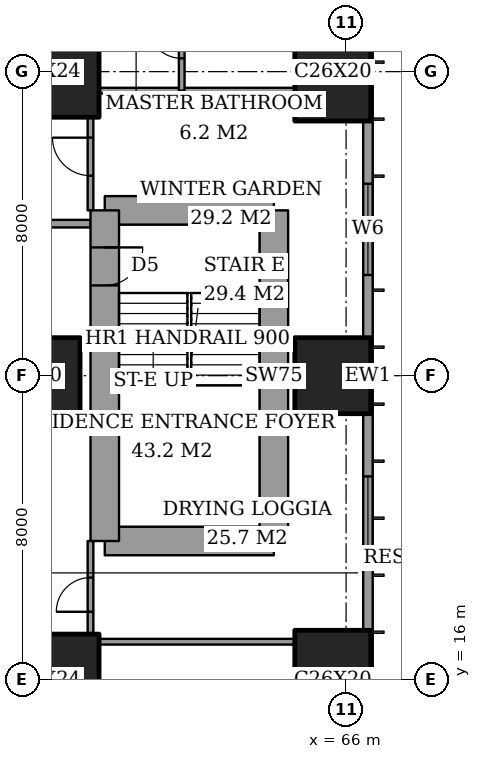
"""IFC4 building model, lengths in metres.
Left out: names, types, materials, properties, quantities, classifications, styles, units other than length and angle.
Written with IfcOpenShell. Run it as: python <this file> out.ifc"""

import sys

from ifc_helpers import new_model, si_unit, direction, frame, frame_2d, origin, origin_2d, place, context, subcontext, project, spatial, rectangle, extrude, element, fill, save


model = new_model("IFC4")
c1 = context("Model", 3, precision=1e-05, world=origin(), true_north=direction((0.0, 1.0)))
c2 = subcontext(c1, "Body", "Model", "MODEL_VIEW")
j1 = project(units=[si_unit("LENGTHUNIT", "METRE"), si_unit("PLANEANGLEUNIT", "RADIAN")], contexts=[c1])
p1 = place(None, origin())
s1 = spatial("IfcSite", under=j1, at=p1, CompositionType="ELEMENT")
p2 = place(p1, origin())
s2 = spatial("IfcBuilding", under=s1, at=p2, CompositionType="ELEMENT")
p3 = place(p2, frame((0.0, 0.0, 54.8)))
s3 = spatial("IfcBuildingStorey", under=s2, at=p3, CompositionType="ELEMENT", Elevation=54.8)
p4 = place(p3, frame((58.0, 16.0, 0.0), z_axis=(0.0, 0.0, 1.0), x_axis=(1.0, 0.0, 0.0)))
e1 = element("IfcColumn", 1, at=p4, inside=s3, PredefinedType="COLUMN", context=c2, shape_type="SweptSolid", body=[
    extrude(rectangle(XDim=3.0, YDim=2.4, at=origin_2d()), origin(), (0.0, 0.0, 1.0), 3.6),
])
p5 = place(p3, frame((58.0, 24.0, 0.0), z_axis=(0.0, 0.0, 1.0), x_axis=(1.0, 0.0, 0.0)))
e2 = element("IfcColumn", 2, at=p5, inside=s3, PredefinedType="COLUMN", context=c2, shape_type="SweptSolid", body=[
    extrude(rectangle(XDim=2.0, YDim=2.0, at=origin_2d()), origin(), (0.0, 0.0, 1.0), 3.6),
])
p6 = place(p3, frame((58.0, 32.0, 0.0), z_axis=(0.0, 0.0, 1.0), x_axis=(1.0, 0.0, 0.0)))
e3 = element("IfcColumn", 3, at=p6, inside=s3, PredefinedType="COLUMN", context=c2, shape_type="SweptSolid", body=[
    extrude(rectangle(XDim=3.0, YDim=2.4, at=origin_2d()), origin(), (0.0, 0.0, 1.0), 3.6),
])
p7 = place(p3, frame((65.65, 16.0, 0.0), z_axis=(0.0, 0.0, 1.0), x_axis=(0.0, 1.0, 0.0)))
e4 = element("IfcColumn", 4, at=p7, inside=s3, PredefinedType="COLUMN", context=c2, shape_type="SweptSolid", body=[
    extrude(rectangle(XDim=2.6, YDim=2.0, at=origin_2d()), origin(), (0.0, 0.0, 1.0), 3.6),
])
p8 = place(p3, frame((65.65, 24.0, 0.0), z_axis=(0.0, 0.0, 1.0), x_axis=(1.0, 0.0, 0.0)))
e5 = element("IfcColumn", 5, at=p8, inside=s3, PredefinedType="COLUMN", context=c2, shape_type="SweptSolid", body=[
    extrude(rectangle(XDim=2.0, YDim=2.0, at=origin_2d()), origin(), (0.0, 0.0, 1.0), 3.6),
])
p9 = place(p3, frame((65.65, 32.0, 0.0), z_axis=(0.0, 0.0, 1.0), x_axis=(0.0, 1.0, 0.0)))
e6 = element("IfcColumn", 6, at=p9, inside=s3, PredefinedType="COLUMN", context=c2, shape_type="SweptSolid", body=[
    extrude(rectangle(XDim=2.6, YDim=2.0, at=origin_2d()), origin(), (0.0, 0.0, 1.0), 3.6),
])
p10 = place(p3, frame((59.65, 19.65, 0.0), z_axis=(0.0, 0.0, 1.0), x_axis=(1.0, 0.0, 0.0)))
e7 = element("IfcWall", 7, at=p10, inside=s3, PredefinedType="SHEAR", context=c2, shape_type="SweptSolid", body=[
    extrude(rectangle(XDim=4.45, YDim=0.75, at=frame_2d((2.225, 0.0))), origin(), (0.0, 0.0, 1.0), 3.6),
])
p11 = place(p3, frame((64.1, 19.65, 0.0), z_axis=(0.0, 0.0, 1.0), x_axis=(0.0, 1.0, 0.0)))
e8 = element("IfcWall", 8, at=p11, inside=s3, PredefinedType="SHEAR", context=c2, shape_type="SweptSolid", body=[
    extrude(rectangle(XDim=8.7, YDim=0.75, at=frame_2d((4.35, 0.0))), origin(), (0.0, 0.0, 1.0), 3.6),
])
p12 = place(p3, frame((64.1, 28.35, 0.0), z_axis=(0.0, 0.0, 1.0), x_axis=(-1.0, 0.0, 0.0)))
e9 = element("IfcWall", 9, at=p12, inside=s3, PredefinedType="SHEAR", context=c2, shape_type="SweptSolid", body=[
    extrude(rectangle(XDim=4.45, YDim=0.75, at=frame_2d((2.225, 0.0))), origin(), (0.0, 0.0, 1.0), 3.6),
])
p13 = place(p3, frame((59.65, 28.35, 0.0), z_axis=(0.0, 0.0, 1.0), x_axis=(0.0, -1.0, 0.0)))
e10 = element("IfcWall", 10, at=p13, inside=s3, PredefinedType="SHEAR", context=c2, shape_type="SweptSolid", body=[
    extrude(rectangle(XDim=8.7, YDim=0.75, at=frame_2d((4.35, 0.0))), origin(), (0.0, 0.0, 1.0), 3.6),
])
p14 = place(p13, frame((0.975, 0.0, 0.0)))
e11 = element("IfcOpeningElement", 11, at=p14, cuts=e10, PredefinedType="OPENING", context=c2, shape_type="SweptSolid", body=[
    extrude(rectangle(XDim=1.0, YDim=2.1, at=frame_2d((0.5, 1.05))), frame((0.0, 0.385, 0.0), z_axis=(0.0, -1.0, 0.0), x_axis=(1.0, 0.0, 0.0)), (0.0, 0.0, 1.0), 0.77),
])
p15 = place(p3, frame((66.575, 3.175, 0.0), z_axis=(0.0, 0.0, 1.0), x_axis=(0.0, 1.0, 0.0)))
e12 = element("IfcWall", 12, at=p15, inside=s3, PredefinedType="SOLIDWALL", context=c2, shape_type="SweptSolid", body=[
    extrude(rectangle(XDim=41.65, YDim=0.25, at=frame_2d((20.825, 0.0))), origin(), (0.0, 0.0, 1.0), 3.6),
])
p16 = place(p15, frame((0.775, 0.0, 0.6)))
e13 = element("IfcOpeningElement", 13, at=p16, cuts=e12, PredefinedType="OPENING", context=c2, shape_type="SweptSolid", body=[
    extrude(rectangle(XDim=2.4, YDim=2.0, at=frame_2d((1.2, 1.0))), frame((0.0, 0.135, 0.0), z_axis=(0.0, -1.0, 0.0), x_axis=(1.0, 0.0, 0.0)), (0.0, 0.0, 1.0), 0.27),
])
p17 = place(p15, frame((6.125, 0.0, 0.6)))
e14 = element("IfcOpeningElement", 14, at=p17, cuts=e12, PredefinedType="OPENING", context=c2, shape_type="SweptSolid", body=[
    extrude(rectangle(XDim=1.2, YDim=2.0, at=frame_2d((0.6, 1.0))), frame((0.0, 0.135, 0.0), z_axis=(0.0, -1.0, 0.0), x_axis=(1.0, 0.0, 0.0)), (0.0, 0.0, 1.0), 0.27),
])
p18 = place(p15, frame((8.375, 0.0, 0.6)))
e15 = element("IfcOpeningElement", 15, at=p18, cuts=e12, PredefinedType="OPENING", context=c2, shape_type="SweptSolid", body=[
    extrude(rectangle(XDim=2.4, YDim=2.0, at=frame_2d((1.2, 1.0))), frame((0.0, 0.135, 0.0), z_axis=(0.0, -1.0, 0.0), x_axis=(1.0, 0.0, 0.0)), (0.0, 0.0, 1.0), 0.27),
])
p19 = place(p15, frame((15.775, 0.0, 0.6)))
e16 = element("IfcOpeningElement", 16, at=p19, cuts=e12, PredefinedType="OPENING", context=c2, shape_type="SweptSolid", body=[
    extrude(rectangle(XDim=2.4, YDim=2.0, at=frame_2d((1.2, 1.0))), frame((0.0, 0.135, 0.0), z_axis=(0.0, -1.0, 0.0), x_axis=(1.0, 0.0, 0.0)), (0.0, 0.0, 1.0), 0.27),
])
p20 = place(p15, frame((23.475, 0.0, 0.6)))
e17 = element("IfcOpeningElement", 17, at=p20, cuts=e12, PredefinedType="OPENING", context=c2, shape_type="SweptSolid", body=[
    extrude(rectangle(XDim=2.4, YDim=2.0, at=frame_2d((1.2, 1.0))), frame((0.0, 0.135, 0.0), z_axis=(0.0, -1.0, 0.0), x_axis=(1.0, 0.0, 0.0)), (0.0, 0.0, 1.0), 0.27),
])
p21 = place(p15, frame((30.775, 0.0, 0.6)))
e18 = element("IfcOpeningElement", 18, at=p21, cuts=e12, PredefinedType="OPENING", context=c2, shape_type="SweptSolid", body=[
    extrude(rectangle(XDim=2.4, YDim=2.0, at=frame_2d((1.2, 1.0))), frame((0.0, 0.135, 0.0), z_axis=(0.0, -1.0, 0.0), x_axis=(1.0, 0.0, 0.0)), (0.0, 0.0, 1.0), 0.27),
])
p22 = place(p15, frame((34.125, 0.0, 0.6)))
e19 = element("IfcOpeningElement", 19, at=p22, cuts=e12, PredefinedType="OPENING", context=c2, shape_type="SweptSolid", body=[
    extrude(rectangle(XDim=1.2, YDim=2.0, at=frame_2d((0.6, 1.0))), frame((0.0, 0.135, 0.0), z_axis=(0.0, -1.0, 0.0), x_axis=(1.0, 0.0, 0.0)), (0.0, 0.0, 1.0), 0.27),
])
p23 = place(p15, frame((38.475, 0.0, 0.6)))
e20 = element("IfcOpeningElement", 20, at=p23, cuts=e12, PredefinedType="OPENING", context=c2, shape_type="SweptSolid", body=[
    extrude(rectangle(XDim=2.4, YDim=2.0, at=frame_2d((1.2, 1.0))), frame((0.0, 0.135, 0.0), z_axis=(0.0, -1.0, 0.0), x_axis=(1.0, 0.0, 0.0)), (0.0, 0.0, 1.0), 0.27),
])
p24 = place(p3, frame((59.5, 17.0, 0.0), z_axis=(0.0, 0.0, 1.0), x_axis=(1.0, 0.0, 0.0)))
e21 = element("IfcWall", 21, at=p24, inside=s3, PredefinedType="PARTITIONING", context=c2, shape_type="SweptSolid", body=[
    extrude(rectangle(XDim=5.15, YDim=0.15, at=frame_2d((2.575, 0.0))), origin(), (0.0, 0.0, 1.0), 3.35),
])
p25 = place(p3, frame((42.0, 28.0, 0.0), z_axis=(0.0, 0.0, 1.0), x_axis=(1.0, 0.0, 0.0)))
e22 = element("IfcWall", 22, at=p25, inside=s3, PredefinedType="PARTITIONING", context=c2, shape_type="SweptSolid", body=[
    extrude(rectangle(XDim=17.275, YDim=0.2, at=frame_2d((8.637, 0.0))), origin(), (0.0, 0.0, 1.0), 3.35),
])
p26 = place(p25, frame((9.2, 0.0, 0.0)))
e23 = element("IfcOpeningElement", 23, at=p26, cuts=e22, PredefinedType="OPENING", context=c2, shape_type="SweptSolid", body=[
    extrude(rectangle(XDim=1.2, YDim=2.4, at=frame_2d((0.6, 1.2))), frame((0.0, 0.11, 0.0), z_axis=(0.0, -1.0, 0.0), x_axis=(1.0, 0.0, 0.0)), (0.0, 0.0, 1.0), 0.22),
])
p27 = place(p3, frame((59.5, 31.5, 0.0), z_axis=(0.0, 0.0, 1.0), x_axis=(1.0, 0.0, 0.0)))
e24 = element("IfcWall", 24, at=p27, inside=s3, PredefinedType="PARTITIONING", context=c2, shape_type="SweptSolid", body=[
    extrude(rectangle(XDim=5.15, YDim=0.15, at=frame_2d((2.575, 0.0))), origin(), (0.0, 0.0, 1.0), 3.35),
])
p28 = place(p3, frame((59.275, 17.2, 0.0), z_axis=(0.0, 0.0, 1.0), x_axis=(0.0, 1.0, 0.0)))
e25 = element("IfcWall", 25, at=p28, inside=s3, PredefinedType="PARTITIONING", context=c2, shape_type="SweptSolid", body=[
    extrude(rectangle(XDim=2.45, YDim=0.15, at=frame_2d((1.225, 0.0))), origin(), (0.0, 0.0, 1.0), 3.35),
])
p29 = place(p28, frame((0.587, 0.0, 0.0)))
e26 = element("IfcOpeningElement", 26, at=p29, cuts=e25, PredefinedType="OPENING", context=c2, shape_type="SweptSolid", body=[
    extrude(rectangle(XDim=0.9, YDim=2.1, at=frame_2d((0.45, 1.05))), frame((0.0, 0.085, 0.0), z_axis=(0.0, -1.0, 0.0), x_axis=(1.0, 0.0, 0.0)), (0.0, 0.0, 1.0), 0.17),
])
p30 = place(p3, frame((59.275, 28.35, 0.0), z_axis=(0.0, 0.0, 1.0), x_axis=(0.0, 1.0, 0.0)))
e27 = element("IfcWall", 27, at=p30, inside=s3, PredefinedType="PARTITIONING", context=c2, shape_type="SweptSolid", body=[
    extrude(rectangle(XDim=2.45, YDim=0.15, at=frame_2d((1.225, 0.0))), origin(), (0.0, 0.0, 1.0), 3.35),
])
p31 = place(p30, frame((0.913, 0.0, 0.0)))
e28 = element("IfcOpeningElement", 28, at=p31, cuts=e27, PredefinedType="OPENING", context=c2, shape_type="SweptSolid", body=[
    extrude(rectangle(XDim=1.0, YDim=2.1, at=frame_2d((0.5, 1.05))), frame((0.0, 0.085, 0.0), z_axis=(0.0, -1.0, 0.0), x_axis=(1.0, 0.0, 0.0)), (0.0, 0.0, 1.0), 0.17),
])
p32 = place(p3, frame((61.675, 31.5, 0.0), z_axis=(0.0, 0.0, 1.0), x_axis=(0.0, 1.0, 0.0)))
e29 = element("IfcWall", 29, at=p32, inside=s3, PredefinedType="PARTITIONING", context=c2, shape_type="SweptSolid", body=[
    extrude(rectangle(XDim=2.6, YDim=0.15, at=frame_2d((1.3, 0.0))), origin(), (0.0, 0.0, 1.0), 3.35),
])
p33 = place(p32, frame((0.85, 0.0, 0.0)))
e30 = element("IfcOpeningElement", 30, at=p33, cuts=e29, PredefinedType="OPENING", context=c2, shape_type="SweptSolid", body=[
    extrude(rectangle(XDim=0.9, YDim=2.1, at=frame_2d((0.45, 1.05))), frame((0.0, 0.085, 0.0), z_axis=(0.0, -1.0, 0.0), x_axis=(1.0, 0.0, 0.0)), (0.0, 0.0, 1.0), 0.17),
])
p34 = place(p19, origin())
e31 = element("IfcWindow", 31, at=p34, inside=s3, PartitioningType="SINGLE_PANEL", PredefinedType="WINDOW", context=c2, shape_type="SweptSolid", body=[
    extrude(rectangle(XDim=2.4, YDim=2.0, at=frame_2d((1.2, 1.0))), frame((0.0, 0.03, 0.0), z_axis=(0.0, -1.0, 0.0), x_axis=(1.0, 0.0, 0.0)), (0.0, 0.0, 1.0), 0.06),
])
fill(e16, e31)
p35 = place(p20, origin())
e32 = element("IfcWindow", 32, at=p35, inside=s3, PartitioningType="SINGLE_PANEL", PredefinedType="WINDOW", context=c2, shape_type="SweptSolid", body=[
    extrude(rectangle(XDim=2.4, YDim=2.0, at=frame_2d((1.2, 1.0))), frame((0.0, 0.03, 0.0), z_axis=(0.0, -1.0, 0.0), x_axis=(1.0, 0.0, 0.0)), (0.0, 0.0, 1.0), 0.06),
])
fill(e17, e32)
p36 = place(p29, origin())
e33 = element("IfcDoor", 33, at=p36, inside=s3, OperationType="SINGLE_SWING_RIGHT", PredefinedType="DOOR", context=c2, shape_type="SweptSolid", body=[
    extrude(rectangle(XDim=0.9, YDim=2.1, at=frame_2d((0.45, 1.05))), frame((0.0, 0.025, 0.0), z_axis=(0.0, -1.0, 0.0), x_axis=(1.0, 0.0, 0.0)), (0.0, 0.0, 1.0), 0.05),
])
fill(e26, e33)
p37 = place(p33, origin())
e34 = element("IfcDoor", 34, at=p37, inside=s3, OperationType="SINGLE_SWING_LEFT", PredefinedType="DOOR", context=c2, shape_type="SweptSolid", body=[
    extrude(rectangle(XDim=0.9, YDim=2.1, at=frame_2d((0.45, 1.05))), frame((0.0, 0.025, 0.0), z_axis=(0.0, -1.0, 0.0), x_axis=(1.0, 0.0, 0.0)), (0.0, 0.0, 1.0), 0.05),
])
fill(e30, e34)
p38 = place(p31, origin())
e35 = element("IfcDoor", 35, at=p38, inside=s3, OperationType="SINGLE_SWING_LEFT", PredefinedType="DOOR", context=c2, shape_type="SweptSolid", body=[
    extrude(rectangle(XDim=1.0, YDim=2.1, at=frame_2d((0.5, 1.05))), frame((0.0, 0.025, 0.0), z_axis=(0.0, -1.0, 0.0), x_axis=(1.0, 0.0, 0.0)), (0.0, 0.0, 1.0), 0.05),
])
fill(e28, e35)
p39 = place(p14, origin())
e36 = element("IfcDoor", 36, at=p39, inside=s3, OperationType="SINGLE_SWING_RIGHT", PredefinedType="DOOR", context=c2, shape_type="SweptSolid", body=[
    extrude(rectangle(XDim=1.0, YDim=2.1, at=frame_2d((0.5, 1.05))), frame((0.0, 0.025, 0.0), z_axis=(0.0, -1.0, 0.0), x_axis=(1.0, 0.0, 0.0)), (0.0, 0.0, 1.0), 0.05),
])
fill(e11, e36)
save(model, sys.argv[1])
